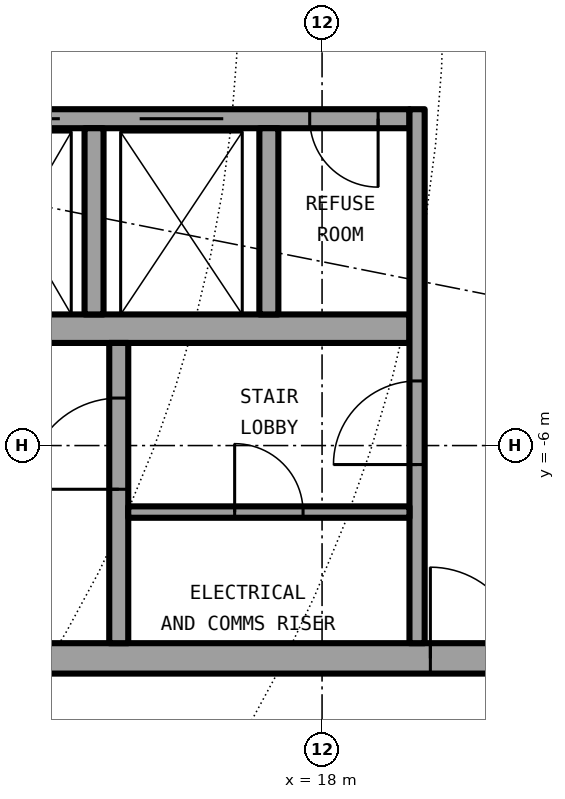
"""IFC4 building model, lengths in metres.
Left out: names, types, materials, properties, quantities, classifications, styles, units other than length and angle.
Written with IfcOpenShell. Run it as: python <this file> out.ifc"""

import sys

from ifc_helpers import new_model, si_unit, direction, frame, frame_2d, origin, place, context, subcontext, project, spatial, rectangle, extrude, element, fill, save


model = new_model("IFC4")
c1 = context("Model", 3, precision=1e-05, world=origin(), true_north=direction((0.0, 1.0)))
c2 = subcontext(c1, "Body", "Model", "MODEL_VIEW")
j1 = project(units=[si_unit("LENGTHUNIT", "METRE"), si_unit("PLANEANGLEUNIT", "RADIAN")], contexts=[c1])
p1 = place(None, origin())
s1 = spatial("IfcSite", under=j1, at=p1, CompositionType="ELEMENT")
p2 = place(p1, origin())
s2 = spatial("IfcBuilding", under=s1, at=p2, CompositionType="ELEMENT")
p3 = place(p2, frame((0.0, 0.0, 249.3)))
s3 = spatial("IfcBuildingStorey", under=s2, at=p3, CompositionType="ELEMENT", Elevation=249.3)
p4 = place(p3, frame((8.6, -8.8, 0.0), z_axis=(0.0, 0.0, 1.0), x_axis=(1.0, 0.0, 0.0)))
e1 = element("IfcWall", 1, at=p4, inside=s3, PredefinedType="SHEAR", context=c2, shape_type="SweptSolid", body=[
    extrude(rectangle(XDim=12.5, YDim=0.4, at=frame_2d((6.25, 0.0))), origin(), (0.0, 0.0, 1.0), 3.05),
])
p5 = place(p4, frame((10.825, 0.0, 0.0)))
e2 = element("IfcOpeningElement", 2, at=p5, cuts=e1, PredefinedType="OPENING", context=c2, shape_type="SweptSolid", body=[
    extrude(rectangle(XDim=1.2, YDim=2.3, at=frame_2d((0.6, 1.15))), frame((0.0, 0.21, 0.0), z_axis=(0.0, -1.0, 0.0), x_axis=(1.0, 0.0, 0.0)), (0.0, 0.0, 1.0), 0.42),
])
p6 = place(p3, frame((19.15, -1.7, 0.0), z_axis=(0.0, 0.0, 1.0), x_axis=(-1.0, 0.0, 0.0)))
e3 = element("IfcWall", 3, at=p6, inside=s3, PredefinedType="SHEAR", context=c2, shape_type="SweptSolid", body=[
    extrude(rectangle(XDim=10.15, YDim=0.25, at=frame_2d((5.075, 0.0))), origin(), (0.0, 0.0, 1.0), 3.05),
])
p7 = place(p6, frame((8.663, 0.0, 0.0)))
e4 = element("IfcOpeningElement", 4, at=p7, cuts=e3, PredefinedType="OPENING", context=c2, shape_type="SweptSolid", body=[
    extrude(rectangle(XDim=1.1, YDim=2.3, at=frame_2d((0.55, 1.15))), frame((0.0, 0.135, 0.0), z_axis=(0.0, -1.0, 0.0), x_axis=(1.0, 0.0, 0.0)), (0.0, 0.0, 1.0), 0.27),
])
p8 = place(p6, frame((6.6, 0.0, 0.0)))
e5 = element("IfcOpeningElement", 5, at=p8, cuts=e3, PredefinedType="OPENING", context=c2, shape_type="SweptSolid", body=[
    extrude(rectangle(XDim=1.1, YDim=2.3, at=frame_2d((0.55, 1.15))), frame((0.0, 0.135, 0.0), z_axis=(0.0, -1.0, 0.0), x_axis=(1.0, 0.0, 0.0)), (0.0, 0.0, 1.0), 0.27),
])
p9 = place(p6, frame((4.6, 0.0, 0.0)))
e6 = element("IfcOpeningElement", 6, at=p9, cuts=e3, PredefinedType="OPENING", context=c2, shape_type="SweptSolid", body=[
    extrude(rectangle(XDim=1.1, YDim=2.3, at=frame_2d((0.55, 1.15))), frame((0.0, 0.135, 0.0), z_axis=(0.0, -1.0, 0.0), x_axis=(1.0, 0.0, 0.0)), (0.0, 0.0, 1.0), 0.27),
])
p10 = place(p6, frame((2.45, 0.0, 0.0)))
e7 = element("IfcOpeningElement", 7, at=p10, cuts=e3, PredefinedType="OPENING", context=c2, shape_type="SweptSolid", body=[
    extrude(rectangle(XDim=1.1, YDim=2.3, at=frame_2d((0.55, 1.15))), frame((0.0, 0.135, 0.0), z_axis=(0.0, -1.0, 0.0), x_axis=(1.0, 0.0, 0.0)), (0.0, 0.0, 1.0), 0.27),
])
p11 = place(p6, frame((0.413, 0.0, 0.0)))
e8 = element("IfcOpeningElement", 8, at=p11, cuts=e3, PredefinedType="OPENING", context=c2, shape_type="SweptSolid", body=[
    extrude(rectangle(XDim=0.9, YDim=2.3, at=frame_2d((0.45, 1.15))), frame((0.0, 0.135, 0.0), z_axis=(0.0, -1.0, 0.0), x_axis=(1.0, 0.0, 0.0)), (0.0, 0.0, 1.0), 0.27),
])
p12 = place(p3, frame((9.0, -4.462, 0.0), z_axis=(0.0, 0.0, 1.0), x_axis=(1.0, 0.0, 0.0)))
e9 = element("IfcWall", 9, at=p12, inside=s3, PredefinedType="SHEAR", context=c2, shape_type="SweptSolid", body=[
    extrude(rectangle(XDim=10.15, YDim=0.375, at=frame_2d((5.075, 0.0))), origin(), (0.0, 0.0, 1.0), 3.05),
])
p13 = place(p3, frame((15.325, -8.6, 0.0), z_axis=(0.0, 0.0, 1.0), x_axis=(0.0, 1.0, 0.0)))
e10 = element("IfcWall", 10, at=p13, inside=s3, PredefinedType="SHEAR", context=c2, shape_type="SweptSolid", body=[
    extrude(rectangle(XDim=3.95, YDim=0.25, at=frame_2d((1.975, 0.0))), origin(), (0.0, 0.0, 1.0), 3.05),
])
p14 = place(p13, frame((2.025, 0.0, 0.0)))
e11 = element("IfcOpeningElement", 11, at=p14, cuts=e10, PredefinedType="OPENING", context=c2, shape_type="SweptSolid", body=[
    extrude(rectangle(XDim=1.2, YDim=2.3, at=frame_2d((0.6, 1.15))), frame((0.0, 0.135, 0.0), z_axis=(0.0, -1.0, 0.0), x_axis=(1.0, 0.0, 0.0)), (0.0, 0.0, 1.0), 0.27),
])
for number, where, z_axis, x_axis in (
    (12, (15.0, -1.825, 0.0), (0.0, 0.0, 1.0), (0.0, -1.0, 0.0)),
    (13, (17.3, -1.825, 0.0), (0.0, 0.0, 1.0), (0.0, -1.0, 0.0)),
):
    element("IfcWall", number, at=place(p3, frame(where, z_axis=z_axis, x_axis=x_axis)), inside=s3, PredefinedType="SOLIDWALL", context=c2, shape_type="SweptSolid", body=[
        extrude(rectangle(XDim=2.45, YDim=0.25, at=frame_2d((1.225, 0.0))), origin(), (0.0, 0.0, 1.0), 2.7),
    ])
p15 = place(p3, frame((19.25, -8.6, 0.0), z_axis=(0.0, 0.0, 1.0), x_axis=(0.0, 1.0, 0.0)))
e14 = element("IfcWall", 14, at=p15, inside=s3, PredefinedType="SOLIDWALL", context=c2, shape_type="SweptSolid", body=[
    extrude(rectangle(XDim=7.025, YDim=0.2, at=frame_2d((3.513, 0.0))), origin(), (0.0, 0.0, 1.0), 2.7),
])
p16 = place(p15, frame((2.35, 0.0, 0.0)))
e15 = element("IfcOpeningElement", 15, at=p16, cuts=e14, PredefinedType="OPENING", context=c2, shape_type="SweptSolid", body=[
    extrude(rectangle(XDim=1.1, YDim=2.3, at=frame_2d((0.55, 1.15))), frame((0.0, 0.11, 0.0), z_axis=(0.0, -1.0, 0.0), x_axis=(1.0, 0.0, 0.0)), (0.0, 0.0, 1.0), 0.22),
])
p17 = place(p3, frame((15.45, -6.875, 0.0), z_axis=(0.0, 0.0, 1.0), x_axis=(1.0, 0.0, 0.0)))
e16 = element("IfcWall", 16, at=p17, inside=s3, PredefinedType="PARTITIONING", context=c2, shape_type="SweptSolid", body=[
    extrude(rectangle(XDim=3.7, YDim=0.15, at=frame_2d((1.85, 0.0))), origin(), (0.0, 0.0, 1.0), 2.7),
])
p18 = place(p17, frame((1.4, 0.0, 0.0)))
e17 = element("IfcOpeningElement", 17, at=p18, cuts=e16, PredefinedType="OPENING", context=c2, shape_type="SweptSolid", body=[
    extrude(rectangle(XDim=0.9, YDim=2.3, at=frame_2d((0.45, 1.15))), frame((0.0, 0.085, 0.0), z_axis=(0.0, -1.0, 0.0), x_axis=(1.0, 0.0, 0.0)), (0.0, 0.0, 1.0), 0.17),
])
p19 = place(p9, origin())
e18 = element("IfcDoor", 18, at=p19, inside=s3, OperationType="DOUBLE_DOOR_SLIDING", PredefinedType="DOOR", context=c2, shape_type="SweptSolid", body=[
    extrude(rectangle(XDim=1.1, YDim=2.3, at=frame_2d((0.55, 1.15))), frame((0.0, 0.025, 0.0), z_axis=(0.0, -1.0, 0.0), x_axis=(1.0, 0.0, 0.0)), (0.0, 0.0, 1.0), 0.05),
])
fill(e6, e18)
p20 = place(p10, origin())
e19 = element("IfcDoor", 19, at=p20, inside=s3, OperationType="DOUBLE_DOOR_SLIDING", PredefinedType="DOOR", context=c2, shape_type="SweptSolid", body=[
    extrude(rectangle(XDim=1.1, YDim=2.3, at=frame_2d((0.55, 1.15))), frame((0.0, 0.025, 0.0), z_axis=(0.0, -1.0, 0.0), x_axis=(1.0, 0.0, 0.0)), (0.0, 0.0, 1.0), 0.05),
])
fill(e7, e19)
p21 = place(p11, origin())
e20 = element("IfcDoor", 20, at=p21, inside=s3, OperationType="SINGLE_SWING_RIGHT", PredefinedType="DOOR", context=c2, shape_type="SweptSolid", body=[
    extrude(rectangle(XDim=0.9, YDim=2.3, at=frame_2d((0.45, 1.15))), frame((0.0, 0.025, 0.0), z_axis=(0.0, -1.0, 0.0), x_axis=(1.0, 0.0, 0.0)), (0.0, 0.0, 1.0), 0.05),
])
fill(e8, e20)
p22 = place(p18, origin())
e21 = element("IfcDoor", 21, at=p22, inside=s3, OperationType="SINGLE_SWING_LEFT", PredefinedType="DOOR", context=c2, shape_type="SweptSolid", body=[
    extrude(rectangle(XDim=0.9, YDim=2.3, at=frame_2d((0.45, 1.15))), frame((0.0, 0.025, 0.0), z_axis=(0.0, -1.0, 0.0), x_axis=(1.0, 0.0, 0.0)), (0.0, 0.0, 1.0), 0.05),
])
fill(e17, e21)
p23 = place(p14, origin())
e22 = element("IfcDoor", 22, at=p23, inside=s3, OperationType="SINGLE_SWING_LEFT", PredefinedType="DOOR", context=c2, shape_type="SweptSolid", body=[
    extrude(rectangle(XDim=1.2, YDim=2.3, at=frame_2d((0.6, 1.15))), frame((0.0, 0.025, 0.0), z_axis=(0.0, -1.0, 0.0), x_axis=(1.0, 0.0, 0.0)), (0.0, 0.0, 1.0), 0.05),
])
fill(e11, e22)
p24 = place(p16, origin())
e23 = element("IfcDoor", 23, at=p24, inside=s3, OperationType="SINGLE_SWING_RIGHT", PredefinedType="DOOR", context=c2, shape_type="SweptSolid", body=[
    extrude(rectangle(XDim=1.1, YDim=2.3, at=frame_2d((0.55, 1.15))), frame((0.0, 0.025, 0.0), z_axis=(0.0, -1.0, 0.0), x_axis=(1.0, 0.0, 0.0)), (0.0, 0.0, 1.0), 0.05),
])
fill(e15, e23)
p25 = place(p5, origin())
e24 = element("IfcDoor", 24, at=p25, inside=s3, OperationType="SINGLE_SWING_LEFT", PredefinedType="DOOR", context=c2, shape_type="SweptSolid", body=[
    extrude(rectangle(XDim=1.2, YDim=2.3, at=frame_2d((0.6, 1.15))), frame((0.0, 0.025, 0.0), z_axis=(0.0, -1.0, 0.0), x_axis=(1.0, 0.0, 0.0)), (0.0, 0.0, 1.0), 0.05),
])
fill(e2, e24)
save(model, sys.argv[1])
